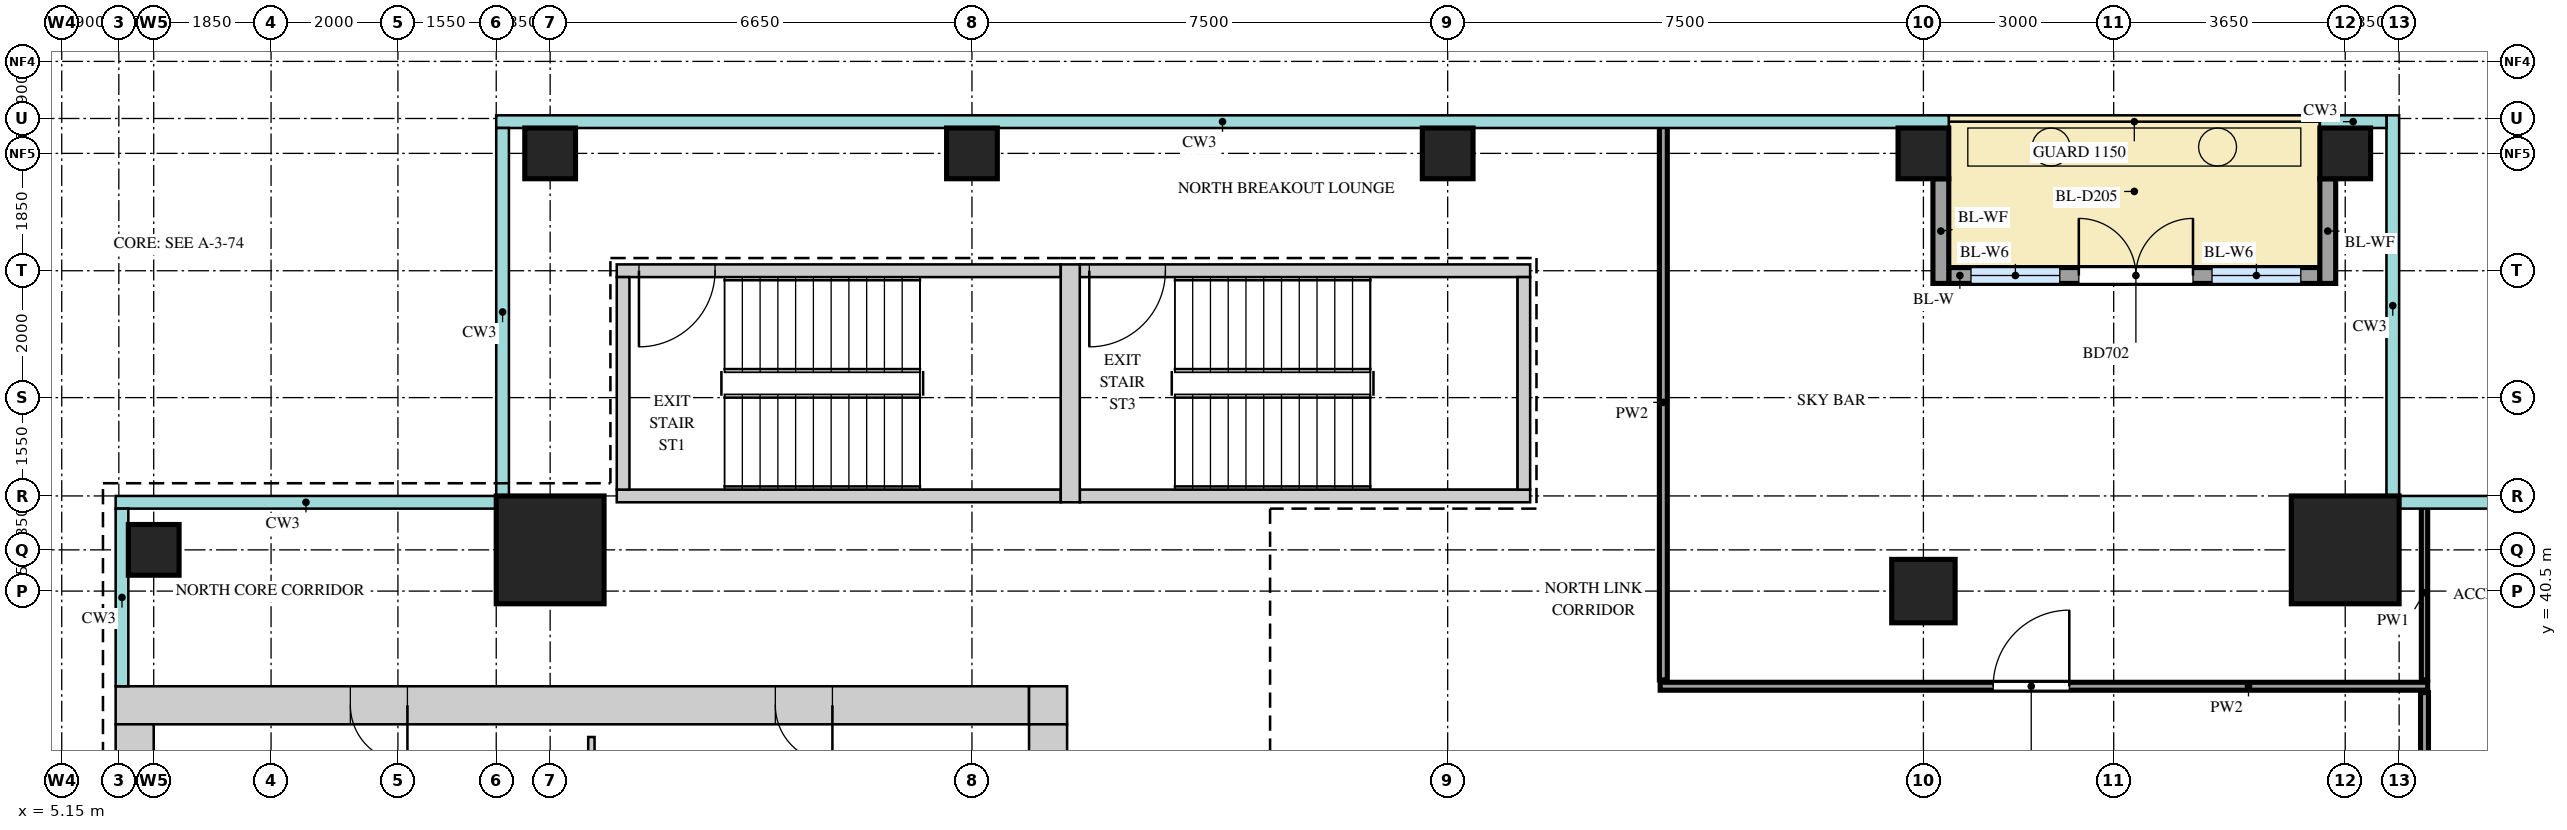
"""IFC4 building model, lengths in metres.
Left out: names, types, materials, properties, quantities, classifications, styles, units other than length and angle.
Written with IfcOpenShell. Run it as: python <this file> out.ifc"""

import sys

from ifc_helpers import new_model, si_unit, direction, frame, frame_2d, origin, origin_2d, place, context, subcontext, project, spatial, rectangle, extrude, source, transform, mapped, element, fill, save


model = new_model("IFC4")
c1 = context("Model", 3, precision=1e-05, world=origin(), true_north=direction((0.0, 1.0)))
c2 = subcontext(c1, "Body", "Model", "MODEL_VIEW")
j1 = project(units=[si_unit("LENGTHUNIT", "METRE"), si_unit("PLANEANGLEUNIT", "RADIAN")], contexts=[c1])
p1 = place(None, origin())
s1 = spatial("IfcSite", under=j1, at=p1, CompositionType="ELEMENT")
p2 = place(p1, origin())
s2 = spatial("IfcBuilding", under=s1, at=p2, CompositionType="ELEMENT")
p3 = place(p2, frame((0.0, 0.0, 310.2)))
s3 = spatial("IfcBuildingStorey", under=s2, at=p3, CompositionType="ELEMENT", Elevation=310.2)
m1 = source(origin(), c2, "Body", "SweptSolid", [
    extrude(rectangle(XDim=14.4, YDim=0.6, at=frame_2d((7.2, 0.0))), origin(), (0.0, 0.0, 1.0), 3.75),
])
p4 = place(p3, frame((6.0, 38.7, 0.0), z_axis=(0.0, 0.0, 1.0), x_axis=(1.0, 0.0, 0.0)))
e1 = element("IfcWall", 1, at=p4, inside=s3, PredefinedType="SHEAR", context=c2, shape_type="MappedRepresentation", body=[
    mapped(m1, transform((0.0, 0.0, 0.0))),
])
m2 = source(origin(), c2, "Body", "SweptSolid", [
    extrude(rectangle(XDim=0.9, YDim=2.1, at=frame_2d((0.45, 1.05))), frame((0.0, 0.31, 0.0), z_axis=(0.0, -1.0, 0.0), x_axis=(1.0, 0.0, 0.0)), (0.0, 0.0, 1.0), 0.62),
])
p5 = place(p4, frame((3.7, 0.0, 0.0)))
e2 = element("IfcOpeningElement", 2, at=p5, cuts=e1, PredefinedType="OPENING", context=c2, shape_type="MappedRepresentation", body=[
    mapped(m2, transform((0.0, 0.0, 0.0))),
])
p6 = place(p4, frame((10.4, 0.0, 0.0)))
e3 = element("IfcOpeningElement", 3, at=p6, cuts=e1, PredefinedType="OPENING", context=c2, shape_type="MappedRepresentation", body=[
    mapped(m2, transform((0.0, 0.0, 0.0))),
])
m3 = source(origin(), c2, "Body", "SweptSolid", [
    extrude(rectangle(XDim=0.6, YDim=0.6, at=frame_2d((0.3, 0.0))), origin(), (0.0, 0.0, 1.0), 3.75),
])
p7 = place(p3, frame((20.4, 38.7, 0.0), z_axis=(0.0, 0.0, 1.0), x_axis=(1.0, 0.0, 0.0)))
e4 = element("IfcWall", 4, at=p7, inside=s3, PredefinedType="SHEAR", context=c2, shape_type="MappedRepresentation", body=[
    mapped(m3, transform((0.0, 0.0, 0.0))),
])
m4 = source(origin(), c2, "Body", "SweptSolid", [
    extrude(rectangle(XDim=22.8, YDim=0.6, at=frame_2d((11.4, 0.0))), origin(), (0.0, 0.0, 1.0), 3.75),
])
p8 = place(p3, frame((20.7, 15.6, 0.0), z_axis=(0.0, 0.0, 1.0), x_axis=(0.0, 1.0, 0.0)))
e5 = element("IfcWall", 5, at=p8, inside=s3, PredefinedType="SHEAR", context=c2, shape_type="MappedRepresentation", body=[
    mapped(m4, transform((0.0, 0.0, 0.0))),
])
m5 = source(origin(), c2, "Body", "SweptSolid", [
    extrude(rectangle(XDim=1.8, YDim=2.1, at=frame_2d((0.9, 1.05))), frame((0.0, 0.31, 0.0), z_axis=(0.0, -1.0, 0.0), x_axis=(1.0, 0.0, 0.0)), (0.0, 0.0, 1.0), 0.62),
])
p9 = place(p8, frame((10.9, 0.0, 0.0)))
e6 = element("IfcOpeningElement", 6, at=p9, cuts=e5, PredefinedType="OPENING", context=c2, shape_type="MappedRepresentation", body=[
    mapped(m5, transform((0.0, 0.0, 0.0))),
])
p10 = place(p8, frame((0.55, 0.0, 0.0)))
e7 = element("IfcOpeningElement", 7, at=p10, cuts=e5, PredefinedType="OPENING", context=c2, shape_type="MappedRepresentation", body=[
    mapped(m2, transform((0.0, 0.0, 0.0))),
])
p11 = place(p8, frame((3.0, 0.0, 0.0)))
e8 = element("IfcOpeningElement", 8, at=p11, cuts=e5, PredefinedType="OPENING", context=c2, shape_type="MappedRepresentation", body=[
    mapped(m2, transform((0.0, 0.0, 0.0))),
])
p12 = place(p8, frame((5.75, 0.0, 0.0)))
e9 = element("IfcOpeningElement", 9, at=p12, cuts=e5, PredefinedType="OPENING", context=c2, shape_type="MappedRepresentation", body=[
    mapped(m2, transform((0.0, 0.0, 0.0))),
])
p13 = place(p3, frame((6.3, 15.6, 0.0), z_axis=(0.0, 0.0, 1.0), x_axis=(0.0, 1.0, 0.0)))
e10 = element("IfcWall", 10, at=p13, inside=s3, PredefinedType="SHEAR", context=c2, shape_type="MappedRepresentation", body=[
    mapped(m4, transform((0.0, 0.0, 0.0))),
])
m6 = source(origin(), c2, "Body", "SweptSolid", [
    extrude(rectangle(XDim=7.0, YDim=0.2, at=frame_2d((3.5, 0.0))), origin(), (0.0, 0.0, 1.0), 3.75),
])
p14 = place(p3, frame((13.9, 45.55, 0.0), z_axis=(0.0, 0.0, 1.0), x_axis=(1.0, 0.0, 0.0)))
e11 = element("IfcWall", 11, at=p14, inside=s3, PredefinedType="SHEAR", context=c2, shape_type="MappedRepresentation", body=[
    mapped(m6, transform((0.0, 0.0, 0.0))),
])
m7 = source(origin(), c2, "Body", "SweptSolid", [
    extrude(rectangle(XDim=1.2, YDim=2.1, at=frame_2d((0.6, 1.05))), frame((0.0, 0.11, 0.0), z_axis=(0.0, -1.0, 0.0), x_axis=(1.0, 0.0, 0.0)), (0.0, 0.0, 1.0), 0.22),
])
p15 = place(p14, frame((0.35, 0.0, 0.0)))
e12 = element("IfcOpeningElement", 12, at=p15, cuts=e11, PredefinedType="OPENING", context=c2, shape_type="MappedRepresentation", body=[
    mapped(m7, transform((0.0, 0.0, 0.0))),
])
p16 = place(p3, frame((13.9, 42.0, 0.0), z_axis=(0.0, 0.0, 1.0), x_axis=(1.0, 0.0, 0.0)))
e13 = element("IfcWall", 13, at=p16, inside=s3, PredefinedType="SHEAR", context=c2, shape_type="MappedRepresentation", body=[
    mapped(m6, transform((0.0, 0.0, 0.0))),
])
m8 = source(origin(), c2, "Body", "SweptSolid", [
    extrude(rectangle(XDim=7.1, YDim=0.2, at=frame_2d((3.55, 0.0))), origin(), (0.0, 0.0, 1.0), 3.75),
])
p17 = place(p3, frame((21.2, 45.55, 0.0), z_axis=(0.0, 0.0, 1.0), x_axis=(1.0, 0.0, 0.0)))
e14 = element("IfcWall", 14, at=p17, inside=s3, PredefinedType="SHEAR", context=c2, shape_type="MappedRepresentation", body=[
    mapped(m8, transform((0.0, 0.0, 0.0))),
])
p18 = place(p17, frame((0.15, 0.0, 0.0)))
e15 = element("IfcOpeningElement", 15, at=p18, cuts=e14, PredefinedType="OPENING", context=c2, shape_type="MappedRepresentation", body=[
    mapped(m7, transform((0.0, 0.0, 0.0))),
])
p19 = place(p3, frame((21.2, 42.0, 0.0), z_axis=(0.0, 0.0, 1.0), x_axis=(1.0, 0.0, 0.0)))
e16 = element("IfcWall", 16, at=p19, inside=s3, PredefinedType="SHEAR", context=c2, shape_type="MappedRepresentation", body=[
    mapped(m8, transform((0.0, 0.0, 0.0))),
])
m9 = source(origin(), c2, "Body", "SweptSolid", [
    extrude(rectangle(XDim=3.75, YDim=0.3, at=frame_2d((1.875, 0.0))), origin(), (0.0, 0.0, 1.0), 3.75),
])
p20 = place(p3, frame((21.05, 41.9, 0.0), z_axis=(0.0, 0.0, 1.0), x_axis=(0.0, 1.0, 0.0)))
e17 = element("IfcWall", 17, at=p20, inside=s3, PredefinedType="SHEAR", context=c2, shape_type="MappedRepresentation", body=[
    mapped(m9, transform((0.0, 0.0, 0.0))),
])
m10 = source(origin(), c2, "Body", "SweptSolid", [
    extrude(rectangle(XDim=3.35, YDim=0.2, at=frame_2d((1.675, 0.0))), origin(), (0.0, 0.0, 1.0), 3.75),
])
for number, where, z_axis, x_axis in (
    (18, (14.0, 42.1, 0.0), (0.0, 0.0, 1.0), (0.0, 1.0, 0.0)),
    (19, (28.2, 42.1, 0.0), (0.0, 0.0, 1.0), (0.0, 1.0, 0.0)),
):
    element("IfcWall", number, at=place(p3, frame(where, z_axis=z_axis, x_axis=x_axis)), inside=s3, PredefinedType="SHEAR", context=c2, shape_type="MappedRepresentation", body=[
        mapped(m10, transform((0.0, 0.0, 0.0))),
    ])
m11 = source(origin(), c2, "Body", "SweptSolid", [
    extrude(rectangle(XDim=1.7, YDim=1.7, at=origin_2d()), origin(), (0.0, 0.0, 1.0), 3.75),
])
for number, where, z_axis, x_axis in (
    (20, (41.15, 41.15, 0.0), (0.0, 0.0, 1.0), (1.0, 0.0, 0.0)),
    (21, (12.85, 41.15, 0.0), (0.0, 0.0, 1.0), (1.0, 0.0, 0.0)),
):
    element("IfcColumn", number, at=place(p3, frame(where, z_axis=z_axis, x_axis=x_axis)), inside=s3, PredefinedType="COLUMN", context=c2, shape_type="MappedRepresentation", body=[
        mapped(m11, transform((0.0, 0.0, 0.0))),
    ])
m12 = source(origin(), c2, "Body", "SweptSolid", [
    extrude(rectangle(XDim=0.8, YDim=0.8, at=origin_2d()), origin(), (0.0, 0.0, 1.0), 3.75),
])
for number, where, z_axis, x_axis in (
    (22, (12.85, 47.4, 0.0), (0.0, 0.0, 1.0), (1.0, 0.0, 0.0)),
    (23, (19.5, 47.4, 0.0), (0.0, 0.0, 1.0), (1.0, 0.0, 0.0)),
    (24, (27.0, 47.4, 0.0), (0.0, 0.0, 1.0), (1.0, 0.0, 0.0)),
    (25, (34.5, 47.4, 0.0), (0.0, 0.0, 1.0), (1.0, 0.0, 0.0)),
    (26, (41.15, 47.4, 0.0), (0.0, 0.0, 1.0), (1.0, 0.0, 0.0)),
    (27, (6.6, 41.15, 0.0), (0.0, 0.0, 1.0), (1.0, 0.0, 0.0)),
):
    element("IfcColumn", number, at=place(p3, frame(where, z_axis=z_axis, x_axis=x_axis)), inside=s3, PredefinedType="COLUMN", context=c2, shape_type="MappedRepresentation", body=[
        mapped(m12, transform((0.0, 0.0, 0.0))),
    ])
m13 = source(origin(), c2, "Body", "SweptSolid", [
    extrude(rectangle(XDim=1.0, YDim=1.0, at=origin_2d()), origin(), (0.0, 0.0, 1.0), 3.75),
])
p21 = place(p3, frame((34.5, 40.5, 0.0), z_axis=(0.0, 0.0, 1.0), x_axis=(1.0, 0.0, 0.0)))
e28 = element("IfcColumn", 28, at=p21, inside=s3, PredefinedType="COLUMN", context=c2, shape_type="MappedRepresentation", body=[
    mapped(m13, transform((0.0, 0.0, 0.0))),
])
m14 = source(origin(), c2, "Body", "SweptSolid", [
    extrude(rectangle(XDim=5.85, YDim=0.25, at=frame_2d((2.925, 0.0))), origin(), (0.0, 0.0, 1.0), 3.75),
])
p22 = place(p3, frame((34.9, 45.475, 0.0), z_axis=(0.0, 0.0, 1.0), x_axis=(1.0, 0.0, 0.0)))
e29 = element("IfcWall", 29, at=p22, inside=s3, PredefinedType="SOLIDWALL", context=c2, shape_type="MappedRepresentation", body=[
    mapped(m14, transform((0.0, 0.0, 0.0))),
])
m15 = source(origin(), c2, "Body", "SweptSolid", [
    extrude(rectangle(XDim=1.4, YDim=2.4, at=frame_2d((0.7, 1.2))), frame((0.0, 0.135, 0.0), z_axis=(0.0, -1.0, 0.0), x_axis=(1.0, 0.0, 0.0)), (0.0, 0.0, 1.0), 0.27),
])
p23 = place(p22, frame((0.35, 0.0, 0.0)))
e30 = element("IfcOpeningElement", 30, at=p23, cuts=e29, PredefinedType="OPENING", context=c2, shape_type="MappedRepresentation", body=[
    mapped(m15, transform((0.0, 0.0, 0.0))),
])
p24 = place(p22, frame((4.15, 0.0, 0.0)))
e31 = element("IfcOpeningElement", 31, at=p24, cuts=e29, PredefinedType="OPENING", context=c2, shape_type="MappedRepresentation", body=[
    mapped(m15, transform((0.0, 0.0, 0.0))),
])
m16 = source(origin(), c2, "Body", "SweptSolid", [
    extrude(rectangle(XDim=1.8, YDim=2.4, at=frame_2d((0.9, 1.2))), frame((0.0, 0.135, 0.0), z_axis=(0.0, -1.0, 0.0), x_axis=(1.0, 0.0, 0.0)), (0.0, 0.0, 1.0), 0.27),
])
p25 = place(p22, frame((2.05, 0.0, 0.0)))
e32 = element("IfcOpeningElement", 32, at=p25, cuts=e29, PredefinedType="OPENING", context=c2, shape_type="MappedRepresentation", body=[
    mapped(m16, transform((0.0, 0.0, 0.0))),
])
m17 = source(origin(), c2, "Body", "SweptSolid", [
    extrude(rectangle(XDim=1.65, YDim=0.25, at=frame_2d((0.825, 0.0))), origin(), (0.0, 0.0, 1.0), 3.45),
])
for number, where, z_axis, x_axis in (
    (33, (34.775, 47.0, 0.0), (0.0, 0.0, 1.0), (0.0, -1.0, 0.0)),
    (34, (40.875, 47.0, 0.0), (0.0, 0.0, 1.0), (0.0, -1.0, 0.0)),
):
    element("IfcWall", number, at=place(p3, frame(where, z_axis=z_axis, x_axis=x_axis)), inside=s3, PredefinedType="SOLIDWALL", context=c2, shape_type="MappedRepresentation", body=[
        mapped(m17, transform((0.0, 0.0, 0.0))),
    ])
m18 = source(origin(), c2, "Body", "SweptSolid", [
    extrude(rectangle(XDim=23.8, YDim=0.125, at=frame_2d((11.9, 0.0))), origin(), (0.0, 0.0, 1.0), 3.8),
])
p26 = place(p3, frame((42.4, 15.1, 0.0), z_axis=(0.0, 0.0, 1.0), x_axis=(0.0, 1.0, 0.0)))
e35 = element("IfcWall", 35, at=p26, inside=s3, PredefinedType="PARTITIONING", context=c2, shape_type="MappedRepresentation", body=[
    mapped(m18, transform((0.0, 0.0, 0.0))),
])
m19 = source(origin(), c2, "Body", "SweptSolid", [
    extrude(rectangle(XDim=1.2, YDim=2.1, at=frame_2d((0.6, 1.05))), frame((0.0, 0.073, 0.0), z_axis=(0.0, -1.0, 0.0), x_axis=(1.0, 0.0, 0.0)), (0.0, 0.0, 1.0), 0.145),
])
p27 = place(p26, frame((1.55, 0.0, 0.0)))
e36 = element("IfcOpeningElement", 36, at=p27, cuts=e35, PredefinedType="OPENING", context=c2, shape_type="MappedRepresentation", body=[
    mapped(m19, transform((0.0, 0.0, 0.0))),
])
p28 = place(p26, frame((7.55, 0.0, 0.0)))
e37 = element("IfcOpeningElement", 37, at=p28, cuts=e35, PredefinedType="OPENING", context=c2, shape_type="MappedRepresentation", body=[
    mapped(m19, transform((0.0, 0.0, 0.0))),
])
m20 = source(origin(), c2, "Body", "SweptSolid", [
    extrude(rectangle(XDim=0.9, YDim=2.1, at=frame_2d((0.45, 1.05))), frame((0.0, 0.073, 0.0), z_axis=(0.0, -1.0, 0.0), x_axis=(1.0, 0.0, 0.0)), (0.0, 0.0, 1.0), 0.145),
])
p29 = place(p26, frame((13.3, 0.0, 0.0)))
e38 = element("IfcOpeningElement", 38, at=p29, cuts=e35, PredefinedType="OPENING", context=c2, shape_type="MappedRepresentation", body=[
    mapped(m20, transform((0.0, 0.0, 0.0))),
])
p30 = place(p26, frame((17.35, 0.0, 0.0)))
e39 = element("IfcOpeningElement", 39, at=p30, cuts=e35, PredefinedType="OPENING", context=c2, shape_type="MappedRepresentation", body=[
    mapped(m20, transform((0.0, 0.0, 0.0))),
])
m21 = source(origin(), c2, "Body", "SweptSolid", [
    extrude(rectangle(XDim=1.0, YDim=2.1, at=frame_2d((0.5, 1.05))), frame((0.0, 0.073, 0.0), z_axis=(0.0, -1.0, 0.0), x_axis=(1.0, 0.0, 0.0)), (0.0, 0.0, 1.0), 0.145),
])
p31 = place(p26, frame((21.15, 0.0, 0.0)))
e40 = element("IfcOpeningElement", 40, at=p31, cuts=e35, PredefinedType="OPENING", context=c2, shape_type="MappedRepresentation", body=[
    mapped(m21, transform((0.0, 0.0, 0.0))),
])
m22 = source(origin(), c2, "Body", "SweptSolid", [
    extrude(rectangle(XDim=6.0, YDim=0.1, at=frame_2d((3.0, 0.0))), origin(), (0.0, 0.0, 1.0), 3.8),
])
p32 = place(p3, frame((13.5, 32.2, 0.0), z_axis=(0.0, 0.0, 1.0), x_axis=(0.0, 1.0, 0.0)))
e41 = element("IfcWall", 41, at=p32, inside=s3, PredefinedType="PARTITIONING", context=c2, shape_type="MappedRepresentation", body=[
    mapped(m22, transform((0.0, 0.0, 0.0))),
])
m23 = source(origin(), c2, "Body", "SweptSolid", [
    extrude(rectangle(XDim=12.1, YDim=0.125, at=frame_2d((6.05, 0.0))), origin(), (0.0, 0.0, 1.0), 3.8),
])
p33 = place(p3, frame((30.35, 39.0, 0.0), z_axis=(0.0, 0.0, 1.0), x_axis=(1.0, 0.0, 0.0)))
e42 = element("IfcWall", 42, at=p33, inside=s3, PredefinedType="PARTITIONING", context=c2, shape_type="MappedRepresentation", body=[
    mapped(m23, transform((0.0, 0.0, 0.0))),
])
p34 = place(p33, frame((5.25, 0.0, 0.0)))
e43 = element("IfcOpeningElement", 43, at=p34, cuts=e42, PredefinedType="OPENING", context=c2, shape_type="MappedRepresentation", body=[
    mapped(m19, transform((0.0, 0.0, 0.0))),
])
m24 = source(origin(), c2, "Body", "SweptSolid", [
    extrude(rectangle(XDim=8.75, YDim=0.125, at=frame_2d((4.375, 0.0))), origin(), (0.0, 0.0, 1.0), 3.8),
])
p35 = place(p3, frame((30.4, 39.1, 0.0), z_axis=(0.0, 0.0, 1.0), x_axis=(0.0, 1.0, 0.0)))
e44 = element("IfcWall", 44, at=p35, inside=s3, PredefinedType="PARTITIONING", context=c2, shape_type="MappedRepresentation", body=[
    mapped(m24, transform((0.0, 0.0, 0.0))),
])
m25 = source(origin(), c2, "Body", "SweptSolid", [
    extrude(rectangle(XDim=2.75, YDim=0.1, at=frame_2d((1.375, 0.0))), origin(), (0.0, 0.0, 1.0), 3.8),
])
p36 = place(p3, frame((42.4, 39.1, 0.0), z_axis=(0.0, 0.0, 1.0), x_axis=(0.0, 1.0, 0.0)))
e45 = element("IfcWall", 45, at=p36, inside=s3, PredefinedType="PARTITIONING", context=c2, shape_type="MappedRepresentation", body=[
    mapped(m25, transform((0.0, 0.0, 0.0))),
])
m26 = source(origin(), c2, "Body", "SweptSolid", [
    extrude(rectangle(XDim=1.4, YDim=2.4, at=frame_2d((0.7, 1.2))), frame((0.0, 0.03, 0.0), z_axis=(0.0, -1.0, 0.0), x_axis=(1.0, 0.0, 0.0)), (0.0, 0.0, 1.0), 0.06),
])
p37 = place(p23, origin())
e46 = element("IfcWindow", 46, at=p37, inside=s3, PartitioningType="SINGLE_PANEL", PredefinedType="WINDOW", context=c2, shape_type="MappedRepresentation", body=[
    mapped(m26, transform((0.0, 0.0, 0.0))),
])
fill(e30, e46)
p38 = place(p24, origin())
e47 = element("IfcWindow", 47, at=p38, inside=s3, PartitioningType="SINGLE_PANEL", PredefinedType="WINDOW", context=c2, shape_type="MappedRepresentation", body=[
    mapped(m26, transform((0.0, 0.0, 0.0))),
])
fill(e31, e47)
m27 = source(origin(), c2, "Body", "SweptSolid", [
    extrude(rectangle(XDim=1.8, YDim=2.4, at=frame_2d((0.9, 1.2))), frame((0.0, 0.025, 0.0), z_axis=(0.0, -1.0, 0.0), x_axis=(1.0, 0.0, 0.0)), (0.0, 0.0, 1.0), 0.05),
])
p39 = place(p25, origin())
e48 = element("IfcDoor", 48, at=p39, inside=s3, OperationType="DOUBLE_DOOR_DOUBLE_SWING", PredefinedType="DOOR", context=c2, shape_type="MappedRepresentation", body=[
    mapped(m27, transform((0.0, 0.0, 0.0))),
])
fill(e32, e48)
m28 = source(origin(), c2, "Body", "SweptSolid", [
    extrude(rectangle(XDim=0.9, YDim=2.1, at=frame_2d((0.45, 1.05))), frame((0.0, 0.25, 0.0), z_axis=(0.0, -1.0, 0.0), x_axis=(1.0, 0.0, 0.0)), (0.0, 0.0, 1.0), 0.5),
])
p40 = place(p5, origin())
e49 = element("IfcDoor", 49, at=p40, inside=s3, OperationType="SINGLE_SWING_RIGHT", PredefinedType="DOOR", context=c2, shape_type="MappedRepresentation", body=[
    mapped(m28, transform((0.0, 0.0, 0.0))),
])
fill(e2, e49)
p41 = place(p6, origin())
e50 = element("IfcDoor", 50, at=p41, inside=s3, OperationType="SINGLE_SWING_RIGHT", PredefinedType="DOOR", context=c2, shape_type="MappedRepresentation", body=[
    mapped(m28, transform((0.0, 0.0, 0.0))),
])
fill(e3, e50)
m29 = source(origin(), c2, "Body", "SweptSolid", [
    extrude(rectangle(XDim=1.2, YDim=2.1, at=frame_2d((0.6, 1.05))), frame((0.0, 0.025, 0.0), z_axis=(0.0, -1.0, 0.0), x_axis=(1.0, 0.0, 0.0)), (0.0, 0.0, 1.0), 0.05),
])
p42 = place(p34, origin())
e51 = element("IfcDoor", 51, at=p42, inside=s3, OperationType="SINGLE_SWING_LEFT", PredefinedType="DOOR", context=c2, shape_type="MappedRepresentation", body=[
    mapped(m29, transform((0.0, 0.0, 0.0))),
])
fill(e43, e51)
p43 = place(p15, origin())
e52 = element("IfcDoor", 52, at=p43, inside=s3, OperationType="SINGLE_SWING_LEFT", PredefinedType="DOOR", context=c2, shape_type="MappedRepresentation", body=[
    mapped(m29, transform((0.0, 0.0, 0.0))),
])
fill(e12, e52)
p44 = place(p18, origin())
e53 = element("IfcDoor", 53, at=p44, inside=s3, OperationType="SINGLE_SWING_LEFT", PredefinedType="DOOR", context=c2, shape_type="MappedRepresentation", body=[
    mapped(m29, transform((0.0, 0.0, 0.0))),
])
fill(e15, e53)
save(model, sys.argv[1])
